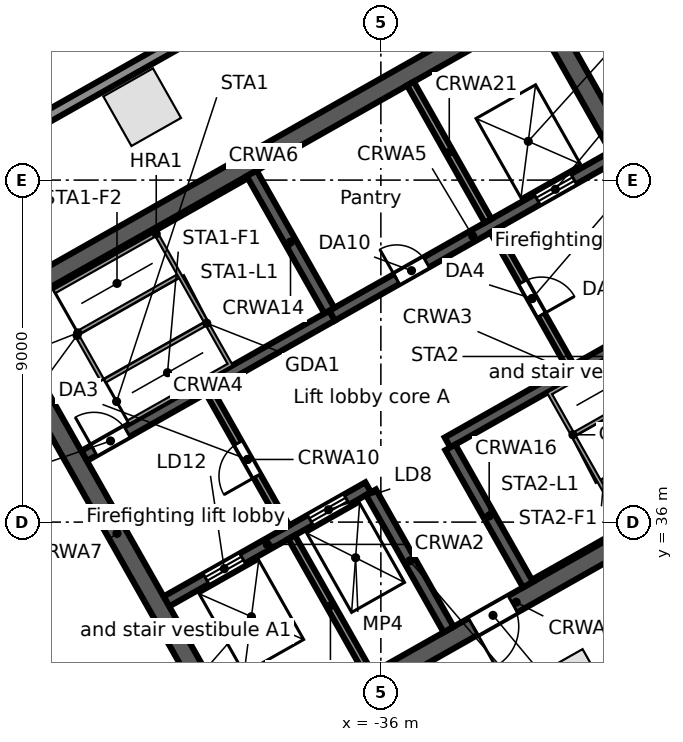
"""IFC4 building model, lengths in metres.
Left out: names, types, materials, properties, quantities, classifications, styles, units other than length and angle.
Written with IfcOpenShell. Run it as: python <this file> out.ifc"""

import sys

from ifc_helpers import new_model, si_unit, direction, frame, frame_2d, origin, origin_2d, place, context, subcontext, project, spatial, rectangle, extrude, element, fill, save


model = new_model("IFC4")
c1 = context("Model", 3, precision=1e-05, world=origin(), true_north=direction((0.0, 1.0)))
c2 = subcontext(c1, "Body", "Model", "MODEL_VIEW")
j1 = project(units=[si_unit("LENGTHUNIT", "METRE"), si_unit("PLANEANGLEUNIT", "RADIAN")], contexts=[c1])
p1 = place(None, origin())
s1 = spatial("IfcSite", under=j1, at=p1, CompositionType="ELEMENT")
p2 = place(p1, origin())
s2 = spatial("IfcBuilding", under=s1, at=p2, CompositionType="ELEMENT")
p3 = place(p2, frame((0.0, 0.0, 154.9)))
s3 = spatial("IfcBuildingStorey", under=s2, at=p3, CompositionType="ELEMENT", Elevation=154.9)
for number, where, z_axis, x_axis in (
    (1, (-42.28, 46.919, 0.0), (0.0, 0.0, 1.0), (-0.87, -0.492, 0.0)),
    (2, (-30.976, 31.635, 0.0), (0.0, 0.0, 1.0), (0.87, 0.492, 0.0)),
):
    element("IfcColumn", number, at=place(p3, frame(where, z_axis=z_axis, x_axis=x_axis)), inside=s3, PredefinedType="COLUMN", context=c2, shape_type="SweptSolid", body=[
        extrude(rectangle(XDim=1.5, YDim=1.5, at=origin_2d()), origin(), (0.0, 0.0, 1.0), 4.0),
    ])
p4 = place(p3, frame((-0.055, 47.969, 0.0), z_axis=(0.0, 0.0, 1.0), x_axis=(-0.870355730478, -0.492423499058, 0.0)))
e3 = element("IfcWall", 3, at=p4, inside=s3, PredefinedType="STANDARD", context=c2, shape_type="SweptSolid", body=[
    extrude(rectangle(XDim=43.75, YDim=0.3, at=frame_2d((21.875, 0.0))), origin(), (0.0, 0.0, 1.0), 3.68),
])
p5 = place(p4, frame((39.977, 0.0, 0.6)))
e4 = element("IfcOpeningElement", 4, at=p5, cuts=e3, PredefinedType="OPENING", context=c2, shape_type="SweptSolid", body=[
    extrude(rectangle(XDim=0.9, YDim=2.4, at=frame_2d((0.45, 1.2))), frame((0.0, 0.16, 0.0), z_axis=(0.0, -1.0, 0.0), x_axis=(1.0, 0.0, 0.0)), (0.0, 0.0, 1.0), 0.32),
])
p6 = place(p4, frame((37.338, 0.0, 0.0)))
e5 = element("IfcOpeningElement", 5, at=p6, cuts=e3, PredefinedType="OPENING", context=c2, shape_type="SweptSolid", body=[
    extrude(rectangle(XDim=1.8, YDim=2.4, at=frame_2d((0.9, 1.2))), frame((0.0, 0.16, 0.0), z_axis=(0.0, -1.0, 0.0), x_axis=(1.0, 0.0, 0.0)), (0.0, 0.0, 1.0), 0.32),
])
p7 = place(p4, frame((31.222, 0.0, 0.6)))
e6 = element("IfcOpeningElement", 6, at=p7, cuts=e3, PredefinedType="OPENING", context=c2, shape_type="SweptSolid", body=[
    extrude(rectangle(XDim=0.9, YDim=2.4, at=frame_2d((0.45, 1.2))), frame((0.0, 0.16, 0.0), z_axis=(0.0, -1.0, 0.0), x_axis=(1.0, 0.0, 0.0)), (0.0, 0.0, 1.0), 0.32),
])
p8 = place(p4, frame((28.584, 0.0, 0.0)))
e7 = element("IfcOpeningElement", 7, at=p8, cuts=e3, PredefinedType="OPENING", context=c2, shape_type="SweptSolid", body=[
    extrude(rectangle(XDim=1.8, YDim=2.4, at=frame_2d((0.9, 1.2))), frame((0.0, 0.16, 0.0), z_axis=(0.0, -1.0, 0.0), x_axis=(1.0, 0.0, 0.0)), (0.0, 0.0, 1.0), 0.32),
])
p9 = place(p4, frame((22.468, 0.0, 0.6)))
e8 = element("IfcOpeningElement", 8, at=p9, cuts=e3, PredefinedType="OPENING", context=c2, shape_type="SweptSolid", body=[
    extrude(rectangle(XDim=0.9, YDim=2.4, at=frame_2d((0.45, 1.2))), frame((0.0, 0.16, 0.0), z_axis=(0.0, -1.0, 0.0), x_axis=(1.0, 0.0, 0.0)), (0.0, 0.0, 1.0), 0.32),
])
p10 = place(p4, frame((19.829, 0.0, 0.0)))
e9 = element("IfcOpeningElement", 9, at=p10, cuts=e3, PredefinedType="OPENING", context=c2, shape_type="SweptSolid", body=[
    extrude(rectangle(XDim=1.8, YDim=2.4, at=frame_2d((0.9, 1.2))), frame((0.0, 0.16, 0.0), z_axis=(0.0, -1.0, 0.0), x_axis=(1.0, 0.0, 0.0)), (0.0, 0.0, 1.0), 0.32),
])
p11 = place(p4, frame((13.713, 0.0, 0.6)))
e10 = element("IfcOpeningElement", 10, at=p11, cuts=e3, PredefinedType="OPENING", context=c2, shape_type="SweptSolid", body=[
    extrude(rectangle(XDim=0.9, YDim=2.4, at=frame_2d((0.45, 1.2))), frame((0.0, 0.16, 0.0), z_axis=(0.0, -1.0, 0.0), x_axis=(1.0, 0.0, 0.0)), (0.0, 0.0, 1.0), 0.32),
])
p12 = place(p4, frame((11.075, 0.0, 0.0)))
e11 = element("IfcOpeningElement", 11, at=p12, cuts=e3, PredefinedType="OPENING", context=c2, shape_type="SweptSolid", body=[
    extrude(rectangle(XDim=1.8, YDim=2.4, at=frame_2d((0.9, 1.2))), frame((0.0, 0.16, 0.0), z_axis=(0.0, -1.0, 0.0), x_axis=(1.0, 0.0, 0.0)), (0.0, 0.0, 1.0), 0.32),
])
p13 = place(p4, frame((4.959, 0.0, 0.6)))
e12 = element("IfcOpeningElement", 12, at=p13, cuts=e3, PredefinedType="OPENING", context=c2, shape_type="SweptSolid", body=[
    extrude(rectangle(XDim=0.9, YDim=2.4, at=frame_2d((0.45, 1.2))), frame((0.0, 0.16, 0.0), z_axis=(0.0, -1.0, 0.0), x_axis=(1.0, 0.0, 0.0)), (0.0, 0.0, 1.0), 0.32),
])
p14 = place(p4, frame((2.32, 0.0, 0.0)))
e13 = element("IfcOpeningElement", 13, at=p14, cuts=e3, PredefinedType="OPENING", context=c2, shape_type="SweptSolid", body=[
    extrude(rectangle(XDim=1.8, YDim=2.4, at=frame_2d((0.9, 1.2))), frame((0.0, 0.16, 0.0), z_axis=(0.0, -1.0, 0.0), x_axis=(1.0, 0.0, 0.0)), (0.0, 0.0, 1.0), 0.32),
])
p15 = place(p3, frame((-58.745, 38.764, 0.0), z_axis=(0.0, 0.0, 1.0), x_axis=(0.870355811726, 0.492423355453, 0.0)))
e14 = element("IfcWall", 14, at=p15, inside=s3, PredefinedType="STANDARD", context=c2, shape_type="SweptSolid", body=[
    extrude(rectangle(XDim=64.025, YDim=0.3, at=frame_2d((32.013, 0.0))), origin(), (0.0, 0.0, 1.0), 3.68),
])
p16 = place(p15, frame((60.122, 0.0, 0.6)))
e15 = element("IfcOpeningElement", 15, at=p16, cuts=e14, PredefinedType="OPENING", context=c2, shape_type="SweptSolid", body=[
    extrude(rectangle(XDim=0.9, YDim=2.4, at=frame_2d((0.45, 1.2))), frame((0.0, 0.16, 0.0), z_axis=(0.0, -1.0, 0.0), x_axis=(1.0, 0.0, 0.0)), (0.0, 0.0, 1.0), 0.32),
])
p17 = place(p15, frame((50.992, 0.0, 0.6)))
e16 = element("IfcOpeningElement", 16, at=p17, cuts=e14, PredefinedType="OPENING", context=c2, shape_type="SweptSolid", body=[
    extrude(rectangle(XDim=0.9, YDim=2.4, at=frame_2d((0.45, 1.2))), frame((0.0, 0.16, 0.0), z_axis=(0.0, -1.0, 0.0), x_axis=(1.0, 0.0, 0.0)), (0.0, 0.0, 1.0), 0.32),
])
p18 = place(p15, frame((41.862, 0.0, 0.6)))
e17 = element("IfcOpeningElement", 17, at=p18, cuts=e14, PredefinedType="OPENING", context=c2, shape_type="SweptSolid", body=[
    extrude(rectangle(XDim=0.9, YDim=2.4, at=frame_2d((0.45, 1.2))), frame((0.0, 0.16, 0.0), z_axis=(0.0, -1.0, 0.0), x_axis=(1.0, 0.0, 0.0)), (0.0, 0.0, 1.0), 0.32),
])
p19 = place(p15, frame((32.732, 0.0, 0.6)))
e18 = element("IfcOpeningElement", 18, at=p19, cuts=e14, PredefinedType="OPENING", context=c2, shape_type="SweptSolid", body=[
    extrude(rectangle(XDim=0.9, YDim=2.4, at=frame_2d((0.45, 1.2))), frame((0.0, 0.16, 0.0), z_axis=(0.0, -1.0, 0.0), x_axis=(1.0, 0.0, 0.0)), (0.0, 0.0, 1.0), 0.32),
])
p20 = place(p15, frame((23.602, 0.0, 0.6)))
e19 = element("IfcOpeningElement", 19, at=p20, cuts=e14, PredefinedType="OPENING", context=c2, shape_type="SweptSolid", body=[
    extrude(rectangle(XDim=0.9, YDim=2.4, at=frame_2d((0.45, 1.2))), frame((0.0, 0.16, 0.0), z_axis=(0.0, -1.0, 0.0), x_axis=(1.0, 0.0, 0.0)), (0.0, 0.0, 1.0), 0.32),
])
p21 = place(p15, frame((14.472, 0.0, 0.6)))
e20 = element("IfcOpeningElement", 20, at=p21, cuts=e14, PredefinedType="OPENING", context=c2, shape_type="SweptSolid", body=[
    extrude(rectangle(XDim=0.9, YDim=2.4, at=frame_2d((0.45, 1.2))), frame((0.0, 0.16, 0.0), z_axis=(0.0, -1.0, 0.0), x_axis=(1.0, 0.0, 0.0)), (0.0, 0.0, 1.0), 0.32),
])
p22 = place(p15, frame((5.342, 0.0, 0.6)))
e21 = element("IfcOpeningElement", 21, at=p22, cuts=e14, PredefinedType="OPENING", context=c2, shape_type="SweptSolid", body=[
    extrude(rectangle(XDim=0.9, YDim=2.4, at=frame_2d((0.45, 1.2))), frame((0.0, 0.16, 0.0), z_axis=(0.0, -1.0, 0.0), x_axis=(1.0, 0.0, 0.0)), (0.0, 0.0, 1.0), 0.32),
])
p23 = place(p3, frame((-44.109, 26.504, 0.0), z_axis=(0.0, 0.0, 1.0), x_axis=(-0.857169502585, 0.515034410344, 0.0)))
e22 = element("IfcWall", 22, at=p23, inside=s3, PredefinedType="STANDARD", context=c2, shape_type="SweptSolid", body=[
    extrude(rectangle(XDim=17.127, YDim=0.3, at=frame_2d((8.563, 0.0))), origin(), (0.0, 0.0, 1.0), 3.68),
])
p24 = place(p23, frame((13.403, 0.0, 0.6)))
e23 = element("IfcOpeningElement", 23, at=p24, cuts=e22, PredefinedType="OPENING", context=c2, shape_type="SweptSolid", body=[
    extrude(rectangle(XDim=0.9, YDim=2.4, at=frame_2d((0.45, 1.2))), frame((0.0, 0.16, 0.0), z_axis=(0.0, -1.0, 0.0), x_axis=(1.0, 0.0, 0.0)), (0.0, 0.0, 1.0), 0.32),
])
p25 = place(p23, frame((4.903, 0.0, 0.6)))
e24 = element("IfcOpeningElement", 24, at=p25, cuts=e22, PredefinedType="OPENING", context=c2, shape_type="SweptSolid", body=[
    extrude(rectangle(XDim=0.9, YDim=2.4, at=frame_2d((0.45, 1.2))), frame((0.0, 0.16, 0.0), z_axis=(0.0, -1.0, 0.0), x_axis=(1.0, 0.0, 0.0)), (0.0, 0.0, 1.0), 0.32),
])
p26 = place(p3, frame((-39.838, 29.705, 0.0), z_axis=(0.0, 0.0, 1.0), x_axis=(0.870350116061, 0.492433422375, 0.0)))
e25 = element("IfcWall", 25, at=p26, inside=s3, PredefinedType="SOLIDWALL", context=c2, shape_type="SweptSolid", body=[
    extrude(rectangle(XDim=17.0, YDim=0.5, at=frame_2d((8.5, 0.0))), origin(), (0.0, 0.0, 1.0), 3.68),
])
p27 = place(p26, frame((7.2, 0.0, 0.0)))
e26 = element("IfcOpeningElement", 26, at=p27, cuts=e25, PredefinedType="OPENING", context=c2, shape_type="SweptSolid", body=[
    extrude(rectangle(XDim=1.2, YDim=2.1, at=frame_2d((0.6, 1.05))), frame((0.0, 0.26, 0.0), z_axis=(0.0, -1.0, 0.0), x_axis=(1.0, 0.0, 0.0)), (0.0, 0.0, 1.0), 0.52),
])
p28 = place(p3, frame((-41.643, 33.912, 0.0), z_axis=(0.0, 0.0, 1.0), x_axis=(0.870343599782, 0.492444939378, 0.0)))
e27 = element("IfcWall", 27, at=p28, inside=s3, PredefinedType="SOLIDWALL", context=c2, shape_type="SweptSolid", body=[
    extrude(rectangle(XDim=6.1, YDim=0.3, at=frame_2d((3.05, 0.0))), origin(), (0.0, 0.0, 1.0), 3.68),
])
p29 = place(p28, frame((1.2, 0.0, 0.0)))
e28 = element("IfcOpeningElement", 28, at=p29, cuts=e27, PredefinedType="OPENING", context=c2, shape_type="SweptSolid", body=[
    extrude(rectangle(XDim=1.1, YDim=2.1, at=frame_2d((0.55, 1.05))), frame((0.0, 0.16, 0.0), z_axis=(0.0, -1.0, 0.0), x_axis=(1.0, 0.0, 0.0)), (0.0, 0.0, 1.0), 0.32),
])
p30 = place(p28, frame((4.35, 0.0, 0.0)))
e29 = element("IfcOpeningElement", 29, at=p30, cuts=e27, PredefinedType="OPENING", context=c2, shape_type="SweptSolid", body=[
    extrude(rectangle(XDim=1.1, YDim=2.1, at=frame_2d((0.55, 1.05))), frame((0.0, 0.16, 0.0), z_axis=(0.0, -1.0, 0.0), x_axis=(1.0, 0.0, 0.0)), (0.0, 0.0, 1.0), 0.32),
])
p31 = place(p3, frame((-34.245, 38.097, 0.0), z_axis=(0.0, 0.0, 1.0), x_axis=(0.870364520461, 0.492407962489, 0.0)))
e30 = element("IfcWall", 30, at=p31, inside=s3, PredefinedType="SOLIDWALL", context=c2, shape_type="SweptSolid", body=[
    extrude(rectangle(XDim=7.5, YDim=0.3, at=frame_2d((3.75, 0.0))), origin(), (0.0, 0.0, 1.0), 3.68),
])
p32 = place(p31, frame((6.2, 0.0, 0.0)))
e31 = element("IfcOpeningElement", 31, at=p32, cuts=e30, PredefinedType="OPENING", context=c2, shape_type="SweptSolid", body=[
    extrude(rectangle(XDim=1.0, YDim=2.1, at=frame_2d((0.5, 1.05))), frame((0.0, 0.16, 0.0), z_axis=(0.0, -1.0, 0.0), x_axis=(1.0, 0.0, 0.0)), (0.0, 0.0, 1.0), 0.32),
])
p33 = place(p3, frame((-43.81, 37.741, 0.0), z_axis=(0.0, 0.0, 1.0), x_axis=(0.870350569555, 0.492432620848, 0.0)))
e32 = element("IfcWall", 32, at=p33, inside=s3, PredefinedType="SOLIDWALL", context=c2, shape_type="SweptSolid", body=[
    extrude(rectangle(XDim=7.5, YDim=0.3, at=frame_2d((3.75, 0.0))), origin(), (0.0, 0.0, 1.0), 3.68),
])
p34 = place(p33, frame((0.3, 0.0, 0.0)))
e33 = element("IfcOpeningElement", 33, at=p34, cuts=e32, PredefinedType="OPENING", context=c2, shape_type="SweptSolid", body=[
    extrude(rectangle(XDim=1.0, YDim=2.1, at=frame_2d((0.5, 1.05))), frame((0.0, 0.16, 0.0), z_axis=(0.0, -1.0, 0.0), x_axis=(1.0, 0.0, 0.0)), (0.0, 0.0, 1.0), 0.32),
])
p35 = place(p3, frame((-37.282, 41.435, 0.0), z_axis=(0.0, 0.0, 1.0), x_axis=(0.870356271124, 0.492422543467, 0.0)))
e34 = element("IfcWall", 34, at=p35, inside=s3, PredefinedType="SOLIDWALL", context=c2, shape_type="SweptSolid", body=[
    extrude(rectangle(XDim=8.5, YDim=0.3, at=frame_2d((4.25, 0.0))), origin(), (0.0, 0.0, 1.0), 3.68),
])
p36 = place(p35, frame((6.2, 0.0, 0.0)))
e35 = element("IfcOpeningElement", 35, at=p36, cuts=e34, PredefinedType="OPENING", context=c2, shape_type="SweptSolid", body=[
    extrude(rectangle(XDim=1.1, YDim=2.1, at=frame_2d((0.55, 1.05))), frame((0.0, 0.16, 0.0), z_axis=(0.0, -1.0, 0.0), x_axis=(1.0, 0.0, 0.0)), (0.0, 0.0, 1.0), 0.32),
])
p37 = place(p35, frame((1.95, 0.0, 0.0)))
e36 = element("IfcOpeningElement", 36, at=p37, cuts=e34, PredefinedType="OPENING", context=c2, shape_type="SweptSolid", body=[
    extrude(rectangle(XDim=0.9, YDim=2.1, at=frame_2d((0.45, 1.05))), frame((0.0, 0.16, 0.0), z_axis=(0.0, -1.0, 0.0), x_axis=(1.0, 0.0, 0.0)), (0.0, 0.0, 1.0), 0.32),
])
p38 = place(p3, frame((-46.486, 41.455, 0.0), z_axis=(0.0, 0.0, 1.0), x_axis=(0.870353598469, 0.492427267353, 0.0)))
e37 = element("IfcWall", 37, at=p38, inside=s3, PredefinedType="SOLIDWALL", context=c2, shape_type="SweptSolid", body=[
    extrude(rectangle(XDim=17.0, YDim=0.5, at=frame_2d((8.5, 0.0))), origin(), (0.0, 0.0, 1.0), 3.68),
])
p39 = place(p3, frame((-46.145, 41.361, 0.0), z_axis=(0.0, 0.0, 1.0), x_axis=(0.492435316254, -0.870349044525, 0.0)))
e38 = element("IfcWall", 38, at=p39, inside=s3, PredefinedType="SOLIDWALL", context=c2, shape_type="SweptSolid", body=[
    extrude(rectangle(XDim=13.0, YDim=0.5, at=frame_2d((6.5, 0.0))), origin(), (0.0, 0.0, 1.0), 3.68),
])
p40 = place(p3, frame((-38.349, 35.603, 0.0), z_axis=(0.0, 0.0, 1.0), x_axis=(0.492396453737, -0.870371031427, 0.0)))
e39 = element("IfcWall", 39, at=p40, inside=s3, PredefinedType="SOLIDWALL", context=c2, shape_type="SweptSolid", body=[
    extrude(rectangle(XDim=4.15, YDim=0.2, at=frame_2d((2.075, 0.0))), origin(), (0.0, 0.0, 1.0), 3.68),
])
p41 = place(p3, frame((-40.516, 39.433, 0.0), z_axis=(0.0, 0.0, 1.0), x_axis=(0.492453559952, -0.87033872216, 0.0)))
e40 = element("IfcWall", 40, at=p41, inside=s3, PredefinedType="PARTITIONING", context=c2, shape_type="SweptSolid", body=[
    extrude(rectangle(XDim=4.1, YDim=0.2, at=frame_2d((2.05, 0.0))), origin(), (0.0, 0.0, 1.0), 3.68),
])
p42 = place(p41, frame((1.55, 0.0, 0.0)))
e41 = element("IfcOpeningElement", 41, at=p42, cuts=e40, PredefinedType="OPENING", context=c2, shape_type="SweptSolid", body=[
    extrude(rectangle(XDim=1.0, YDim=2.1, at=frame_2d((0.5, 1.05))), frame((0.0, 0.11, 0.0), z_axis=(0.0, -1.0, 0.0), x_axis=(1.0, 0.0, 0.0)), (0.0, 0.0, 1.0), 0.22),
])
for number, where, z_axis, x_axis in (
    (42, (-36.26, 36.785, 0.0), (0.0, 0.0, 1.0), (0.492, -0.87, 0.0)),
    (43, (-39.399, 45.177, 0.0), (0.0, 0.0, 1.0), (0.492, -0.87, 0.0)),
    (44, (-34.171, 37.967, 0.0), (0.0, 0.0, 1.0), (0.492, -0.87, 0.0)),
):
    element("IfcWall", number, at=place(p3, frame(where, z_axis=z_axis, x_axis=x_axis)), inside=s3, PredefinedType="SOLIDWALL", context=c2, shape_type="SweptSolid", body=[
        extrude(rectangle(XDim=4.15, YDim=0.3, at=frame_2d((2.075, 0.0))), origin(), (0.0, 0.0, 1.0), 3.68),
    ])
p43 = place(p3, frame((-33.031, 43.667, 0.0), z_axis=(0.0, 0.0, 1.0), x_axis=(0.492408451753, -0.87036424366, 0.0)))
e45 = element("IfcWall", 45, at=p43, inside=s3, PredefinedType="PARTITIONING", context=c2, shape_type="SweptSolid", body=[
    extrude(rectangle(XDim=4.1, YDim=0.2, at=frame_2d((2.05, 0.0))), origin(), (0.0, 0.0, 1.0), 3.68),
])
p44 = place(p43, frame((1.55, 0.0, 0.0)))
e46 = element("IfcOpeningElement", 46, at=p44, cuts=e45, PredefinedType="OPENING", context=c2, shape_type="SweptSolid", body=[
    extrude(rectangle(XDim=1.0, YDim=2.1, at=frame_2d((0.5, 1.05))), frame((0.0, 0.11, 0.0), z_axis=(0.0, -1.0, 0.0), x_axis=(1.0, 0.0, 0.0)), (0.0, 0.0, 1.0), 0.22),
])
p45 = place(p3, frame((-35.222, 47.541, 0.0), z_axis=(0.0, 0.0, 1.0), x_axis=(0.492421666909, -0.870356767055, 0.0)))
e47 = element("IfcWall", 47, at=p45, inside=s3, PredefinedType="SOLIDWALL", context=c2, shape_type="SweptSolid", body=[
    extrude(rectangle(XDim=4.15, YDim=0.2, at=frame_2d((2.075, 0.0))), origin(), (0.0, 0.0, 1.0), 3.68),
])
p46 = place(p3, frame((-31.784, 49.486, 0.0), z_axis=(0.0, 0.0, 1.0), x_axis=(0.492435316254, -0.870349044525, 0.0)))
e48 = element("IfcWall", 48, at=p46, inside=s3, PredefinedType="SOLIDWALL", context=c2, shape_type="SweptSolid", body=[
    extrude(rectangle(XDim=13.0, YDim=0.5, at=frame_2d((6.5, 0.0))), origin(), (0.0, 0.0, 1.0), 3.68),
])
p47 = place(p3, frame((-30.785, 54.411, 0.0), z_axis=(0.0, 0.0, 1.0), x_axis=(0.490135904292, -0.871646026391, 0.0)))
e49 = element("IfcWall", 49, at=p47, inside=s3, PredefinedType="PARTITIONING", context=c2, shape_type="SweptSolid", body=[
    extrude(rectangle(XDim=17.295, YDim=0.125, at=frame_2d((8.647, 0.0))), origin(), (0.0, 0.0, 1.0), 2.852),
])
p48 = place(p36, origin())
e50 = element("IfcDoor", 50, at=p48, inside=s3, OperationType="DOUBLE_DOOR_SLIDING", PredefinedType="DOOR", context=c2, shape_type="SweptSolid", body=[
    extrude(rectangle(XDim=1.1, YDim=2.1, at=frame_2d((0.55, 1.05))), frame((0.0, 0.025, 0.0), z_axis=(0.0, -1.0, 0.0), x_axis=(1.0, 0.0, 0.0)), (0.0, 0.0, 1.0), 0.05),
])
fill(e35, e50)
p49 = place(p29, origin())
e51 = element("IfcDoor", 51, at=p49, inside=s3, OperationType="DOUBLE_DOOR_SLIDING", PredefinedType="DOOR", context=c2, shape_type="SweptSolid", body=[
    extrude(rectangle(XDim=1.1, YDim=2.1, at=frame_2d((0.55, 1.05))), frame((0.0, 0.025, 0.0), z_axis=(0.0, -1.0, 0.0), x_axis=(1.0, 0.0, 0.0)), (0.0, 0.0, 1.0), 0.05),
])
fill(e28, e51)
p50 = place(p30, origin())
e52 = element("IfcDoor", 52, at=p50, inside=s3, OperationType="DOUBLE_DOOR_SLIDING", PredefinedType="DOOR", context=c2, shape_type="SweptSolid", body=[
    extrude(rectangle(XDim=1.1, YDim=2.1, at=frame_2d((0.55, 1.05))), frame((0.0, 0.025, 0.0), z_axis=(0.0, -1.0, 0.0), x_axis=(1.0, 0.0, 0.0)), (0.0, 0.0, 1.0), 0.05),
])
fill(e29, e52)
p51 = place(p34, origin())
e53 = element("IfcDoor", 53, at=p51, inside=s3, OperationType="SINGLE_SWING_LEFT", PredefinedType="DOOR", context=c2, shape_type="SweptSolid", body=[
    extrude(rectangle(XDim=1.0, YDim=2.1, at=frame_2d((0.5, 1.05))), frame((0.0, 0.025, 0.0), z_axis=(0.0, -1.0, 0.0), x_axis=(1.0, 0.0, 0.0)), (0.0, 0.0, 1.0), 0.05),
])
fill(e33, e53)
p52 = place(p42, frame((1.0, 0.0, 0.0), z_axis=(0.0, 0.0, 1.0), x_axis=(-1.0, 0.0, 0.0)))
e54 = element("IfcDoor", 54, at=p52, inside=s3, OperationType="SINGLE_SWING_LEFT", PredefinedType="DOOR", context=c2, shape_type="SweptSolid", body=[
    extrude(rectangle(XDim=1.0, YDim=2.1, at=frame_2d((0.5, 1.05))), frame((0.0, 0.025, 0.0), z_axis=(0.0, -1.0, 0.0), x_axis=(1.0, 0.0, 0.0)), (0.0, 0.0, 1.0), 0.05),
])
fill(e41, e54)
p53 = place(p44, origin())
e55 = element("IfcDoor", 55, at=p53, inside=s3, OperationType="SINGLE_SWING_RIGHT", PredefinedType="DOOR", context=c2, shape_type="SweptSolid", body=[
    extrude(rectangle(XDim=1.0, YDim=2.1, at=frame_2d((0.5, 1.05))), frame((0.0, 0.025, 0.0), z_axis=(0.0, -1.0, 0.0), x_axis=(1.0, 0.0, 0.0)), (0.0, 0.0, 1.0), 0.05),
])
fill(e46, e55)
p54 = place(p27, frame((1.2, 0.0, 0.0), z_axis=(0.0, 0.0, 1.0), x_axis=(-1.0, 0.0, 0.0)))
e56 = element("IfcDoor", 56, at=p54, inside=s3, OperationType="SINGLE_SWING_RIGHT", PredefinedType="DOOR", context=c2, shape_type="SweptSolid", body=[
    extrude(rectangle(XDim=1.2, YDim=2.1, at=frame_2d((0.6, 1.05))), frame((0.0, 0.025, 0.0), z_axis=(0.0, -1.0, 0.0), x_axis=(1.0, 0.0, 0.0)), (0.0, 0.0, 1.0), 0.05),
])
fill(e26, e56)
p55 = place(p37, origin())
e57 = element("IfcDoor", 57, at=p55, inside=s3, OperationType="SINGLE_SWING_LEFT", PredefinedType="DOOR", context=c2, shape_type="SweptSolid", body=[
    extrude(rectangle(XDim=0.9, YDim=2.1, at=frame_2d((0.45, 1.05))), frame((0.0, 0.025, 0.0), z_axis=(0.0, -1.0, 0.0), x_axis=(1.0, 0.0, 0.0)), (0.0, 0.0, 1.0), 0.05),
])
fill(e36, e57)
save(model, sys.argv[1])
